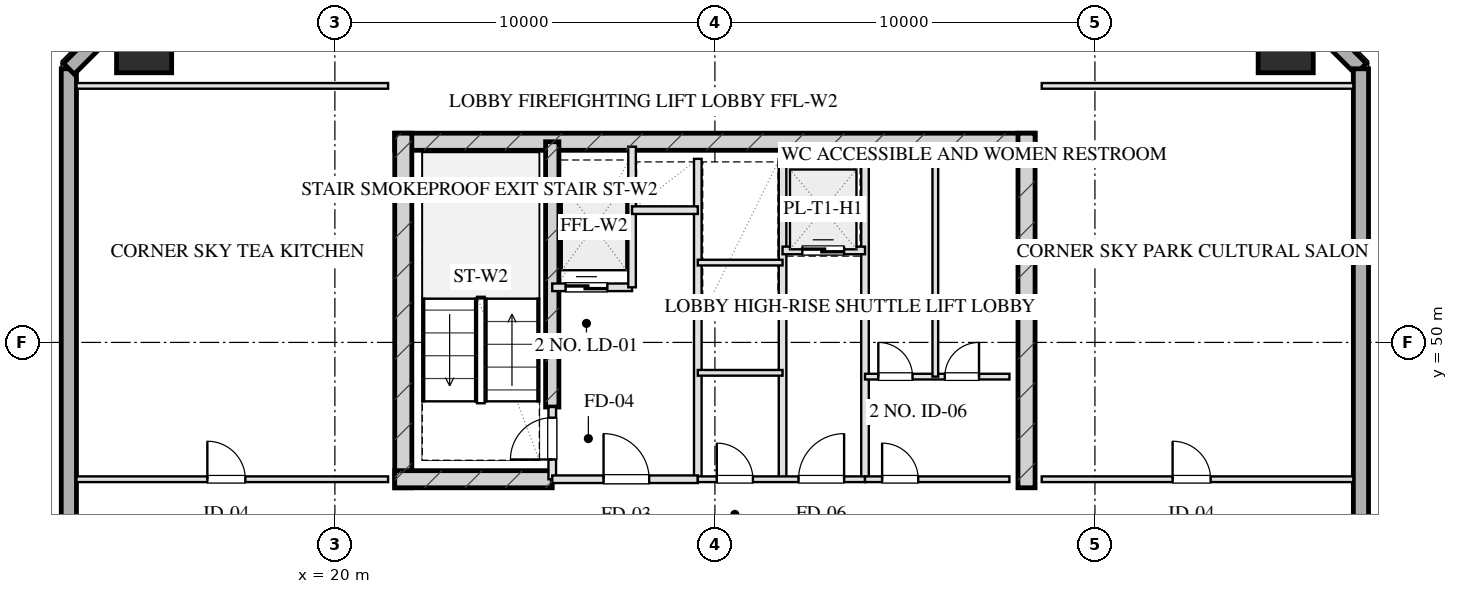
"""IFC4 building model, lengths in metres.
Left out: names, types, materials, properties, quantities, classifications, styles, units other than length and angle.
Written with IfcOpenShell. Run it as: python <this file> out.ifc"""

import sys

from ifc_helpers import new_model, si_unit, direction, frame, frame_2d, origin, origin_2d, place, context, subcontext, project, spatial, rectangle, hollow_rectangle, extrude, element, fill, save


model = new_model("IFC4")
c1 = context("Model", 3, precision=1e-05, world=origin(), true_north=direction((0.0, 1.0)))
c2 = subcontext(c1, "Body", "Model", "MODEL_VIEW")
j1 = project(units=[si_unit("LENGTHUNIT", "METRE"), si_unit("PLANEANGLEUNIT", "RADIAN")], contexts=[c1])
p1 = place(None, origin())
s1 = spatial("IfcSite", under=j1, at=p1, CompositionType="ELEMENT")
p2 = place(p1, origin())
s2 = spatial("IfcBuilding", under=s1, at=p2, CompositionType="ELEMENT")
p3 = place(p2, frame((0.0, 0.0, 219.65)))
s3 = spatial("IfcBuildingStorey", under=s2, at=p3, CompositionType="ELEMENT", Elevation=219.65)
p4 = place(p3, frame((21.575, 55.28, 0.0), z_axis=(0.0, 0.0, 1.0), x_axis=(1.0, 0.0, 0.0)))
e1 = element("IfcWall", 1, at=p4, inside=s3, PredefinedType="SHEAR", context=c2, shape_type="SweptSolid", body=[
    extrude(rectangle(XDim=16.85, YDim=0.45, at=frame_2d((8.425, 0.0))), origin(), (0.0, 0.0, 1.0), 3.45),
])
for number, where, z_axis, x_axis in (
    (2, (21.8, 46.175, 0.0), (0.0, 0.0, 1.0), (0.0, 1.0, 0.0)),
    (3, (38.2, 46.175, 0.0), (0.0, 0.0, 1.0), (0.0, 1.0, 0.0)),
):
    element("IfcWall", number, at=place(p3, frame(where, z_axis=z_axis, x_axis=x_axis)), inside=s3, PredefinedType="SHEAR", context=c2, shape_type="SweptSolid", body=[
        extrude(rectangle(XDim=9.33, YDim=0.45, at=frame_2d((4.665, 0.0))), origin(), (0.0, 0.0, 1.0), 3.45),
    ])
p5 = place(p3, frame((25.72, 48.3, 0.0), z_axis=(0.0, 0.0, 1.0), x_axis=(0.0, 1.0, 0.0)))
e4 = element("IfcWall", 4, at=p5, inside=s3, PredefinedType="SHEAR", context=c2, shape_type="SweptSolid", body=[
    extrude(rectangle(XDim=6.98, YDim=0.35, at=frame_2d((3.49, 0.0))), origin(), (0.0, 0.0, 1.0), 3.45),
])
p6 = place(p3, frame((21.575, 46.4, 0.0), z_axis=(0.0, 0.0, 1.0), x_axis=(1.0, 0.0, 0.0)))
e5 = element("IfcWall", 5, at=p6, inside=s3, PredefinedType="SHEAR", context=c2, shape_type="SweptSolid", body=[
    extrude(rectangle(XDim=4.145, YDim=0.45, at=frame_2d((2.073, 0.0))), origin(), (0.0, 0.0, 1.0), 3.45),
])
for number, where, z_axis, x_axis in (
    (6, (45.02, 57.82, 0.0), (0.0, 0.0, 1.0), (1.0, 0.0, 0.0)),
    (7, (14.98, 57.82, 0.0), (0.0, 0.0, 1.0), (1.0, 0.0, 0.0)),
):
    element("IfcColumn", number, at=place(p3, frame(where, z_axis=z_axis, x_axis=x_axis)), inside=s3, PredefinedType="COLUMN", context=c2, shape_type="SweptSolid", body=[
        extrude(hollow_rectangle(XDim=1.45, YDim=1.45, WallThickness=0.05, at=origin_2d()), origin(), (0.0, 0.0, 1.0), 3.451),
    ])
p7 = place(p3, frame((13.0, 10.8, 0.0), z_axis=(0.0, 0.0, 1.0), x_axis=(0.0, 1.0, 0.0)))
e8 = element("IfcWall", 8, at=p7, inside=s3, PredefinedType="SOLIDWALL", context=c2, shape_type="SweptSolid", body=[
    extrude(rectangle(XDim=46.4, YDim=0.4, at=frame_2d((23.2, 0.0))), origin(), (0.0, 0.0, 1.0), 2.61),
])
p8 = place(p7, frame((15.75, 0.0, 0.75)))
e9 = element("IfcOpeningElement", 9, at=p8, cuts=e8, PredefinedType="OPENING", context=c2, shape_type="SweptSolid", body=[
    extrude(rectangle(XDim=2.1, YDim=1.46, at=frame_2d((1.05, 0.73))), frame((0.0, 0.21, 0.0), z_axis=(0.0, -1.0, 0.0), x_axis=(1.0, 0.0, 0.0)), (0.0, 0.0, 1.0), 0.42),
])
p9 = place(p7, frame((19.55, 0.0, 0.75)))
e10 = element("IfcOpeningElement", 10, at=p9, cuts=e8, PredefinedType="OPENING", context=c2, shape_type="SweptSolid", body=[
    extrude(rectangle(XDim=2.1, YDim=1.46, at=frame_2d((1.05, 0.73))), frame((0.0, 0.21, 0.0), z_axis=(0.0, -1.0, 0.0), x_axis=(1.0, 0.0, 0.0)), (0.0, 0.0, 1.0), 0.42),
])
p10 = place(p7, frame((24.75, 0.0, 0.75)))
e11 = element("IfcOpeningElement", 11, at=p10, cuts=e8, PredefinedType="OPENING", context=c2, shape_type="SweptSolid", body=[
    extrude(rectangle(XDim=2.1, YDim=1.46, at=frame_2d((1.05, 0.73))), frame((0.0, 0.21, 0.0), z_axis=(0.0, -1.0, 0.0), x_axis=(1.0, 0.0, 0.0)), (0.0, 0.0, 1.0), 0.42),
])
p11 = place(p7, frame((28.55, 0.0, 0.75)))
e12 = element("IfcOpeningElement", 12, at=p11, cuts=e8, PredefinedType="OPENING", context=c2, shape_type="SweptSolid", body=[
    extrude(rectangle(XDim=2.1, YDim=1.46, at=frame_2d((1.05, 0.73))), frame((0.0, 0.21, 0.0), z_axis=(0.0, -1.0, 0.0), x_axis=(1.0, 0.0, 0.0)), (0.0, 0.0, 1.0), 0.42),
])
for number, where, z_axis, x_axis in (
    (13, (13.0, 57.2, 0.0), (0.0, 0.0, 1.0), (0.707, 0.707, 0.0)),
    (14, (44.4, 59.8, 0.0), (0.0, 0.0, 1.0), (0.707, -0.707, 0.0)),
):
    element("IfcWall", number, at=place(p3, frame(where, z_axis=z_axis, x_axis=x_axis)), inside=s3, PredefinedType="SOLIDWALL", context=c2, shape_type="SweptSolid", body=[
        extrude(rectangle(XDim=3.677, YDim=0.4, at=frame_2d((1.838, 0.0))), origin(), (0.0, 0.0, 1.0), 2.61),
    ])
p12 = place(p3, frame((47.0, 57.2, 0.0), z_axis=(0.0, 0.0, 1.0), x_axis=(0.0, -1.0, 0.0)))
e15 = element("IfcWall", 15, at=p12, inside=s3, PredefinedType="SOLIDWALL", context=c2, shape_type="SweptSolid", body=[
    extrude(rectangle(XDim=46.4, YDim=0.4, at=frame_2d((23.2, 0.0))), origin(), (0.0, 0.0, 1.0), 2.61),
])
p13 = place(p12, frame((20.85, 0.0, 0.0)))
e16 = element("IfcOpeningElement", 16, at=p13, cuts=e15, PredefinedType="OPENING", context=c2, shape_type="SweptSolid", body=[
    extrude(rectangle(XDim=1.8, YDim=2.2, at=frame_2d((0.9, 1.1))), frame((0.0, 0.21, 0.0), z_axis=(0.0, -1.0, 0.0), x_axis=(1.0, 0.0, 0.0)), (0.0, 0.0, 1.0), 0.42),
])
p14 = place(p3, frame((25.72, 46.4, 0.0), z_axis=(0.0, 0.0, 1.0), x_axis=(0.0, 1.0, 0.0)))
e17 = element("IfcWall", 17, at=p14, inside=s3, PredefinedType="PARTITIONING", context=c2, shape_type="SweptSolid", body=[
    extrude(rectangle(XDim=1.9, YDim=0.2, at=frame_2d((0.95, 0.0))), origin(), (0.0, 0.0, 1.0), 3.175),
])
p15 = place(p14, frame((0.52, 0.0, 0.0)))
e18 = element("IfcOpeningElement", 18, at=p15, cuts=e17, PredefinedType="OPENING", context=c2, shape_type="SweptSolid", body=[
    extrude(rectangle(XDim=1.1, YDim=2.05, at=frame_2d((0.55, 1.025))), frame((0.0, 0.11, 0.0), z_axis=(0.0, -1.0, 0.0), x_axis=(1.0, 0.0, 0.0)), (0.0, 0.0, 1.0), 0.22),
])
p16 = place(p3, frame((29.55, 46.4, 0.0), z_axis=(0.0, 0.0, 1.0), x_axis=(0.0, 1.0, 0.0)))
e19 = element("IfcWall", 19, at=p16, inside=s3, PredefinedType="PARTITIONING", context=c2, shape_type="SweptSolid", body=[
    extrude(rectangle(XDim=8.43, YDim=0.2, at=frame_2d((4.215, 0.0))), origin(), (0.0, 0.0, 1.0), 3.175),
])
p17 = place(p3, frame((25.72, 46.4, 0.0), z_axis=(0.0, 0.0, 1.0), x_axis=(1.0, 0.0, 0.0)))
e20 = element("IfcWall", 20, at=p17, inside=s3, PredefinedType="PARTITIONING", context=c2, shape_type="SweptSolid", body=[
    extrude(rectangle(XDim=3.83, YDim=0.2, at=frame_2d((1.915, 0.0))), origin(), (0.0, 0.0, 1.0), 3.175),
])
p18 = place(p17, frame((1.35, 0.0, 0.0)))
e21 = element("IfcOpeningElement", 21, at=p18, cuts=e20, PredefinedType="OPENING", context=c2, shape_type="SweptSolid", body=[
    extrude(rectangle(XDim=1.2, YDim=2.05, at=frame_2d((0.6, 1.025))), frame((0.0, 0.11, 0.0), z_axis=(0.0, -1.0, 0.0), x_axis=(1.0, 0.0, 0.0)), (0.0, 0.0, 1.0), 0.22),
])
p19 = place(p3, frame((25.72, 51.45, 0.0), z_axis=(0.0, 0.0, 1.0), x_axis=(1.0, 0.0, 0.0)))
e22 = element("IfcWall", 22, at=p19, inside=s3, PredefinedType="PARTITIONING", context=c2, shape_type="SweptSolid", body=[
    extrude(rectangle(XDim=2.1, YDim=0.2, at=frame_2d((1.05, 0.0))), origin(), (0.0, 0.0, 1.0), 3.175),
])
p20 = place(p19, frame((0.35, 0.0, 0.0)))
e23 = element("IfcOpeningElement", 23, at=p20, cuts=e22, PredefinedType="OPENING", context=c2, shape_type="SweptSolid", body=[
    extrude(rectangle(XDim=1.1, YDim=2.05, at=frame_2d((0.55, 1.025))), frame((0.0, 0.11, 0.0), z_axis=(0.0, -1.0, 0.0), x_axis=(1.0, 0.0, 0.0)), (0.0, 0.0, 1.0), 0.22),
])
p21 = place(p3, frame((27.82, 51.45, 0.0), z_axis=(0.0, 0.0, 1.0), x_axis=(0.0, 1.0, 0.0)))
e24 = element("IfcWall", 24, at=p21, inside=s3, PredefinedType="PARTITIONING", context=c2, shape_type="SweptSolid", body=[
    extrude(rectangle(XDim=3.7, YDim=0.2, at=frame_2d((1.85, 0.0))), origin(), (0.0, 0.0, 1.0), 3.175),
])
p22 = place(p3, frame((27.82, 53.48, 0.0), z_axis=(0.0, 0.0, 1.0), x_axis=(1.0, 0.0, 0.0)))
e25 = element("IfcWall", 25, at=p22, inside=s3, PredefinedType="PARTITIONING", context=c2, shape_type="SweptSolid", body=[
    extrude(rectangle(XDim=1.73, YDim=0.2, at=frame_2d((0.865, 0.0))), origin(), (0.0, 0.0, 1.0), 3.175),
])
for number, where, z_axis, x_axis in (
    (26, (33.95, 46.4, 0.0), (0.0, 0.0, 1.0), (0.0, 1.0, 0.0)),
    (27, (31.78, 46.4, 0.0), (0.0, 0.0, 1.0), (0.0, 1.0, 0.0)),
):
    element("IfcWall", number, at=place(p3, frame(where, z_axis=z_axis, x_axis=x_axis)), inside=s3, PredefinedType="PARTITIONING", context=c2, shape_type="SweptSolid", body=[
        extrude(rectangle(XDim=8.43, YDim=0.2, at=frame_2d((4.215, 0.0))), origin(), (0.0, 0.0, 1.0), 3.175),
    ])
p23 = place(p3, frame((29.55, 46.4, 0.0), z_axis=(0.0, 0.0, 1.0), x_axis=(1.0, 0.0, 0.0)))
e28 = element("IfcWall", 28, at=p23, inside=s3, PredefinedType="PARTITIONING", context=c2, shape_type="SweptSolid", body=[
    extrude(rectangle(XDim=4.4, YDim=0.15, at=frame_2d((2.2, 0.0))), origin(), (0.0, 0.0, 1.0), 3.175),
])
p24 = place(p23, frame((0.5, 0.0, 0.0)))
e29 = element("IfcOpeningElement", 29, at=p24, cuts=e28, PredefinedType="OPENING", context=c2, shape_type="SweptSolid", body=[
    extrude(rectangle(XDim=0.95, YDim=2.05, at=frame_2d((0.475, 1.025))), frame((0.0, 0.085, 0.0), z_axis=(0.0, -1.0, 0.0), x_axis=(1.0, 0.0, 0.0)), (0.0, 0.0, 1.0), 0.17),
])
p25 = place(p23, frame((2.65, 0.0, 0.0)))
e30 = element("IfcOpeningElement", 30, at=p25, cuts=e28, PredefinedType="OPENING", context=c2, shape_type="SweptSolid", body=[
    extrude(rectangle(XDim=1.2, YDim=2.05, at=frame_2d((0.6, 1.025))), frame((0.0, 0.085, 0.0), z_axis=(0.0, -1.0, 0.0), x_axis=(1.0, 0.0, 0.0)), (0.0, 0.0, 1.0), 0.17),
])
for number, where, z_axis, x_axis in (
    (31, (29.55, 49.2, 0.0), (0.0, 0.0, 1.0), (1.0, 0.0, 0.0)),
    (32, (29.55, 52.1, 0.0), (0.0, 0.0, 1.0), (1.0, 0.0, 0.0)),
):
    element("IfcWall", number, at=place(p3, frame(where, z_axis=z_axis, x_axis=x_axis)), inside=s3, PredefinedType="PARTITIONING", context=c2, shape_type="SweptSolid", body=[
        extrude(rectangle(XDim=2.23, YDim=0.15, at=frame_2d((1.115, 0.0))), origin(), (0.0, 0.0, 1.0), 3.175),
    ])
p26 = place(p3, frame((31.78, 52.42, 0.0), z_axis=(0.0, 0.0, 1.0), x_axis=(1.0, 0.0, 0.0)))
e33 = element("IfcWall", 33, at=p26, inside=s3, PredefinedType="PARTITIONING", context=c2, shape_type="SweptSolid", body=[
    extrude(rectangle(XDim=2.17, YDim=0.2, at=frame_2d((1.085, 0.0))), origin(), (0.0, 0.0, 1.0), 3.175),
])
p27 = place(p26, frame((0.52, 0.0, 0.0)))
e34 = element("IfcOpeningElement", 34, at=p27, cuts=e33, PredefinedType="OPENING", context=c2, shape_type="SweptSolid", body=[
    extrude(rectangle(XDim=1.1, YDim=2.05, at=frame_2d((0.55, 1.025))), frame((0.0, 0.11, 0.0), z_axis=(0.0, -1.0, 0.0), x_axis=(1.0, 0.0, 0.0)), (0.0, 0.0, 1.0), 0.22),
])
p28 = place(p3, frame((33.95, 46.4, 0.0), z_axis=(0.0, 0.0, 1.0), x_axis=(1.0, 0.0, 0.0)))
e35 = element("IfcWall", 35, at=p28, inside=s3, PredefinedType="PARTITIONING", context=c2, shape_type="SweptSolid", body=[
    extrude(rectangle(XDim=3.8, YDim=0.15, at=frame_2d((1.9, 0.0))), origin(), (0.0, 0.0, 1.0), 3.175),
])
p29 = place(p28, frame((0.45, 0.0, 0.0)))
e36 = element("IfcOpeningElement", 36, at=p29, cuts=e35, PredefinedType="OPENING", context=c2, shape_type="SweptSolid", body=[
    extrude(rectangle(XDim=0.95, YDim=2.05, at=frame_2d((0.475, 1.025))), frame((0.0, 0.085, 0.0), z_axis=(0.0, -1.0, 0.0), x_axis=(1.0, 0.0, 0.0)), (0.0, 0.0, 1.0), 0.17),
])
p30 = place(p3, frame((33.95, 49.1, 0.0), z_axis=(0.0, 0.0, 1.0), x_axis=(1.0, 0.0, 0.0)))
e37 = element("IfcWall", 37, at=p30, inside=s3, PredefinedType="PARTITIONING", context=c2, shape_type="SweptSolid", body=[
    extrude(rectangle(XDim=3.8, YDim=0.15, at=frame_2d((1.9, 0.0))), origin(), (0.0, 0.0, 1.0), 3.175),
])
p31 = place(p30, frame((0.35, 0.0, 0.0)))
e38 = element("IfcOpeningElement", 38, at=p31, cuts=e37, PredefinedType="OPENING", context=c2, shape_type="SweptSolid", body=[
    extrude(rectangle(XDim=0.9, YDim=2.05, at=frame_2d((0.45, 1.025))), frame((0.0, 0.085, 0.0), z_axis=(0.0, -1.0, 0.0), x_axis=(1.0, 0.0, 0.0)), (0.0, 0.0, 1.0), 0.17),
])
p32 = place(p30, frame((2.1, 0.0, 0.0)))
e39 = element("IfcOpeningElement", 39, at=p32, cuts=e37, PredefinedType="OPENING", context=c2, shape_type="SweptSolid", body=[
    extrude(rectangle(XDim=0.9, YDim=2.05, at=frame_2d((0.45, 1.025))), frame((0.0, 0.085, 0.0), z_axis=(0.0, -1.0, 0.0), x_axis=(1.0, 0.0, 0.0)), (0.0, 0.0, 1.0), 0.17),
])
p33 = place(p3, frame((35.8, 49.1, 0.0), z_axis=(0.0, 0.0, 1.0), x_axis=(0.0, 1.0, 0.0)))
e40 = element("IfcWall", 40, at=p33, inside=s3, PredefinedType="PARTITIONING", context=c2, shape_type="SweptSolid", body=[
    extrude(rectangle(XDim=5.73, YDim=0.15, at=frame_2d((2.865, 0.0))), origin(), (0.0, 0.0, 1.0), 3.175),
])
p34 = place(p3, frame((13.2, 56.75, 0.0), z_axis=(0.0, 0.0, 1.0), x_axis=(1.0, 0.0, 0.0)))
e41 = element("IfcWall", 41, at=p34, inside=s3, PredefinedType="PARTITIONING", context=c2, shape_type="SweptSolid", body=[
    extrude(rectangle(XDim=8.2, YDim=0.15, at=frame_2d((4.1, 0.0))), origin(), (0.0, 0.0, 1.0), 3.175),
])
p35 = place(p3, frame((13.2, 46.4, 0.0), z_axis=(0.0, 0.0, 1.0), x_axis=(1.0, 0.0, 0.0)))
e42 = element("IfcWall", 42, at=p35, inside=s3, PredefinedType="PARTITIONING", context=c2, shape_type="SweptSolid", body=[
    extrude(rectangle(XDim=8.2, YDim=0.15, at=frame_2d((4.1, 0.0))), origin(), (0.0, 0.0, 1.0), 3.175),
])
p36 = place(p35, frame((3.444, 0.0, 0.0)))
e43 = element("IfcOpeningElement", 43, at=p36, cuts=e42, PredefinedType="OPENING", context=c2, shape_type="SweptSolid", body=[
    extrude(rectangle(XDim=1.0, YDim=2.05, at=frame_2d((0.5, 1.025))), frame((0.0, 0.085, 0.0), z_axis=(0.0, -1.0, 0.0), x_axis=(1.0, 0.0, 0.0)), (0.0, 0.0, 1.0), 0.17),
])
p37 = place(p3, frame((38.6, 56.75, 0.0), z_axis=(0.0, 0.0, 1.0), x_axis=(1.0, 0.0, 0.0)))
e44 = element("IfcWall", 44, at=p37, inside=s3, PredefinedType="PARTITIONING", context=c2, shape_type="SweptSolid", body=[
    extrude(rectangle(XDim=8.2, YDim=0.15, at=frame_2d((4.1, 0.0))), origin(), (0.0, 0.0, 1.0), 3.175),
])
p38 = place(p3, frame((38.6, 46.4, 0.0), z_axis=(0.0, 0.0, 1.0), x_axis=(1.0, 0.0, 0.0)))
e45 = element("IfcWall", 45, at=p38, inside=s3, PredefinedType="PARTITIONING", context=c2, shape_type="SweptSolid", body=[
    extrude(rectangle(XDim=8.2, YDim=0.15, at=frame_2d((4.1, 0.0))), origin(), (0.0, 0.0, 1.0), 3.175),
])
p39 = place(p38, frame((3.444, 0.0, 0.0)))
e46 = element("IfcOpeningElement", 46, at=p39, cuts=e45, PredefinedType="OPENING", context=c2, shape_type="SweptSolid", body=[
    extrude(rectangle(XDim=1.0, YDim=2.05, at=frame_2d((0.5, 1.025))), frame((0.0, 0.085, 0.0), z_axis=(0.0, -1.0, 0.0), x_axis=(1.0, 0.0, 0.0)), (0.0, 0.0, 1.0), 0.17),
])
p40 = place(p15, origin())
e47 = element("IfcDoor", 47, at=p40, inside=s3, OperationType="SINGLE_SWING_LEFT", PredefinedType="DOOR", context=c2, shape_type="SweptSolid", body=[
    extrude(rectangle(XDim=1.1, YDim=2.05, at=frame_2d((0.55, 1.025))), frame((0.0, 0.025, 0.0), z_axis=(0.0, -1.0, 0.0), x_axis=(1.0, 0.0, 0.0)), (0.0, 0.0, 1.0), 0.05),
])
fill(e18, e47)
p41 = place(p18, origin())
e48 = element("IfcDoor", 48, at=p41, inside=s3, OperationType="SINGLE_SWING_LEFT", PredefinedType="DOOR", context=c2, shape_type="SweptSolid", body=[
    extrude(rectangle(XDim=1.2, YDim=2.05, at=frame_2d((0.6, 1.025))), frame((0.0, 0.025, 0.0), z_axis=(0.0, -1.0, 0.0), x_axis=(1.0, 0.0, 0.0)), (0.0, 0.0, 1.0), 0.05),
])
fill(e21, e48)
p42 = place(p20, origin())
e49 = element("IfcDoor", 49, at=p42, inside=s3, OperationType="DOUBLE_DOOR_SLIDING", PredefinedType="DOOR", context=c2, shape_type="SweptSolid", body=[
    extrude(rectangle(XDim=1.1, YDim=2.05, at=frame_2d((0.55, 1.025))), frame((0.0, 0.025, 0.0), z_axis=(0.0, -1.0, 0.0), x_axis=(1.0, 0.0, 0.0)), (0.0, 0.0, 1.0), 0.05),
])
fill(e23, e49)
p43 = place(p24, origin())
e50 = element("IfcDoor", 50, at=p43, inside=s3, OperationType="SINGLE_SWING_LEFT", PredefinedType="DOOR", context=c2, shape_type="SweptSolid", body=[
    extrude(rectangle(XDim=0.95, YDim=2.05, at=frame_2d((0.475, 1.025))), frame((0.0, 0.025, 0.0), z_axis=(0.0, -1.0, 0.0), x_axis=(1.0, 0.0, 0.0)), (0.0, 0.0, 1.0), 0.05),
])
fill(e29, e50)
p44 = place(p25, origin())
e51 = element("IfcDoor", 51, at=p44, inside=s3, OperationType="SINGLE_SWING_RIGHT", PredefinedType="DOOR", context=c2, shape_type="SweptSolid", body=[
    extrude(rectangle(XDim=1.2, YDim=2.05, at=frame_2d((0.6, 1.025))), frame((0.0, 0.025, 0.0), z_axis=(0.0, -1.0, 0.0), x_axis=(1.0, 0.0, 0.0)), (0.0, 0.0, 1.0), 0.05),
])
fill(e30, e51)
p45 = place(p27, origin())
e52 = element("IfcDoor", 52, at=p45, inside=s3, OperationType="DOUBLE_DOOR_SLIDING", PredefinedType="DOOR", context=c2, shape_type="SweptSolid", body=[
    extrude(rectangle(XDim=1.1, YDim=2.05, at=frame_2d((0.55, 1.025))), frame((0.0, 0.025, 0.0), z_axis=(0.0, -1.0, 0.0), x_axis=(1.0, 0.0, 0.0)), (0.0, 0.0, 1.0), 0.05),
])
fill(e34, e52)
p46 = place(p29, origin())
e53 = element("IfcDoor", 53, at=p46, inside=s3, OperationType="SINGLE_SWING_LEFT", PredefinedType="DOOR", context=c2, shape_type="SweptSolid", body=[
    extrude(rectangle(XDim=0.95, YDim=2.05, at=frame_2d((0.475, 1.025))), frame((0.0, 0.025, 0.0), z_axis=(0.0, -1.0, 0.0), x_axis=(1.0, 0.0, 0.0)), (0.0, 0.0, 1.0), 0.05),
])
fill(e36, e53)
p47 = place(p31, origin())
e54 = element("IfcDoor", 54, at=p47, inside=s3, OperationType="SINGLE_SWING_LEFT", PredefinedType="DOOR", context=c2, shape_type="SweptSolid", body=[
    extrude(rectangle(XDim=0.9, YDim=2.05, at=frame_2d((0.45, 1.025))), frame((0.0, 0.025, 0.0), z_axis=(0.0, -1.0, 0.0), x_axis=(1.0, 0.0, 0.0)), (0.0, 0.0, 1.0), 0.05),
])
fill(e38, e54)
p48 = place(p32, origin())
e55 = element("IfcDoor", 55, at=p48, inside=s3, OperationType="SINGLE_SWING_RIGHT", PredefinedType="DOOR", context=c2, shape_type="SweptSolid", body=[
    extrude(rectangle(XDim=0.9, YDim=2.05, at=frame_2d((0.45, 1.025))), frame((0.0, 0.025, 0.0), z_axis=(0.0, -1.0, 0.0), x_axis=(1.0, 0.0, 0.0)), (0.0, 0.0, 1.0), 0.05),
])
fill(e39, e55)
p49 = place(p36, origin())
e56 = element("IfcDoor", 56, at=p49, inside=s3, OperationType="SINGLE_SWING_LEFT", PredefinedType="DOOR", context=c2, shape_type="SweptSolid", body=[
    extrude(rectangle(XDim=1.0, YDim=2.05, at=frame_2d((0.5, 1.025))), frame((0.0, 0.025, 0.0), z_axis=(0.0, -1.0, 0.0), x_axis=(1.0, 0.0, 0.0)), (0.0, 0.0, 1.0), 0.05),
])
fill(e43, e56)
p50 = place(p39, origin())
e57 = element("IfcDoor", 57, at=p50, inside=s3, OperationType="SINGLE_SWING_LEFT", PredefinedType="DOOR", context=c2, shape_type="SweptSolid", body=[
    extrude(rectangle(XDim=1.0, YDim=2.05, at=frame_2d((0.5, 1.025))), frame((0.0, 0.025, 0.0), z_axis=(0.0, -1.0, 0.0), x_axis=(1.0, 0.0, 0.0)), (0.0, 0.0, 1.0), 0.05),
])
fill(e46, e57)
save(model, sys.argv[1])
